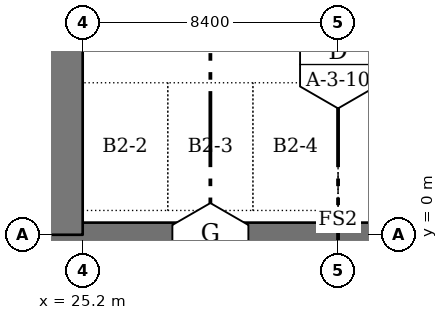
"""IFC4 building model, lengths in metres.
Left out: names, types, materials, properties, quantities, classifications, styles, units other than length and angle.
Written with IfcOpenShell. Run it as: python <this file> out.ifc"""

import sys

from ifc_helpers import new_model, si_unit, direction, frame, frame_2d, origin, place, context, subcontext, project, spatial, rectangle, extrude, element, save


model = new_model("IFC4")
c1 = context("Model", 3, precision=1e-05, world=origin(), true_north=direction((0.0, 1.0)))
c2 = subcontext(c1, "Body", "Model", "MODEL_VIEW")
j1 = project(units=[si_unit("LENGTHUNIT", "METRE"), si_unit("PLANEANGLEUNIT", "RADIAN")], contexts=[c1])
p1 = place(None, origin())
s1 = spatial("IfcSite", under=j1, at=p1, CompositionType="ELEMENT")
p2 = place(p1, origin())
s2 = spatial("IfcBuilding", under=s1, at=p2, CompositionType="ELEMENT")
p3 = place(p2, frame((0.0, 0.0, -8.0)))
s3 = spatial("IfcBuildingStorey", under=s2, at=p3, CompositionType="ELEMENT", Elevation=-8.0)
p4 = place(p3, frame((-8.8, 0.0, 0.0), z_axis=(0.0, 0.0, 1.0), x_axis=(1.0, 0.0, 0.0)))
e1 = element("IfcWall", 1, at=p4, inside=s3, PredefinedType="SOLIDWALL", context=c2, shape_type="SweptSolid", body=[
    extrude(rectangle(XDim=76.0, YDim=0.8, at=frame_2d((38.0, 0.0))), origin(), (0.0, 0.0, 1.0), 3.7),
])
p5 = place(p3, frame((24.6, 0.0, 0.0), z_axis=(0.0, 0.0, 1.0), x_axis=(0.0, 1.0, 0.0)))
e2 = element("IfcWall", 2, at=p5, inside=s3, PredefinedType="SHEAR", context=c2, shape_type="SweptSolid", body=[
    extrude(rectangle(XDim=25.2, YDim=1.2, at=frame_2d((12.6, 0.0))), origin(), (0.0, 0.0, 1.0), 3.7),
])
save(model, sys.argv[1])
